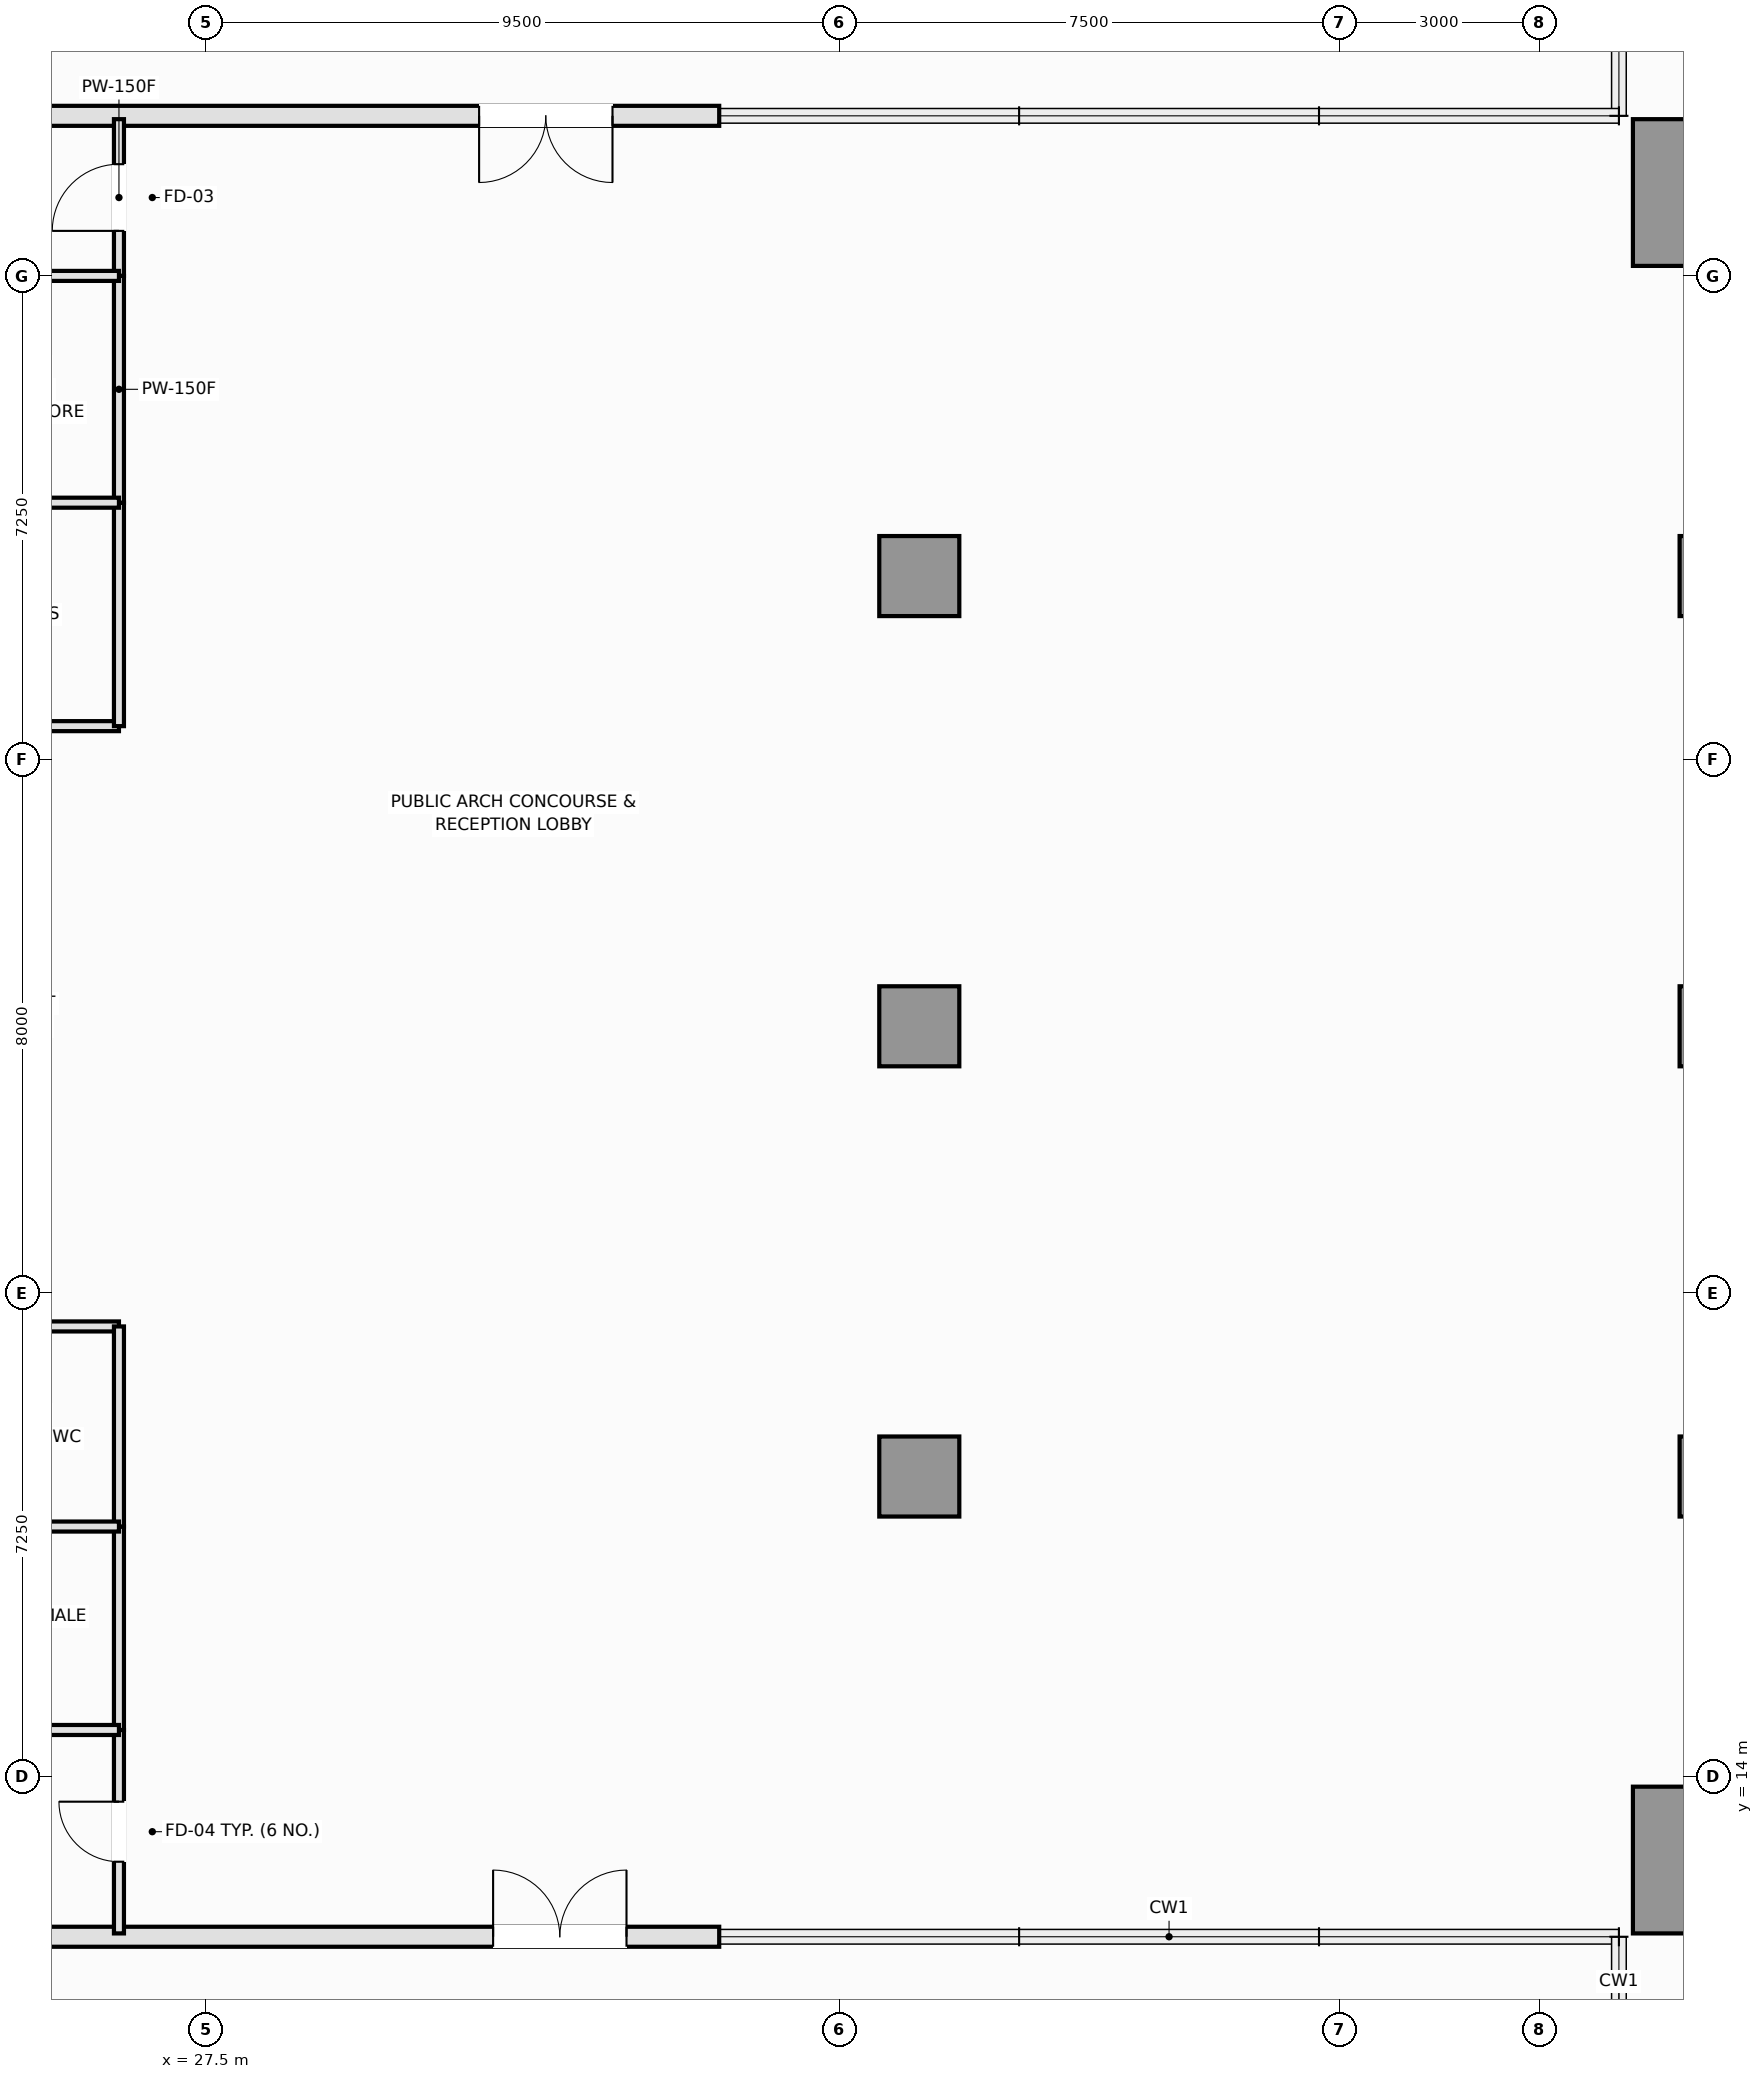
"""IFC4 building model, lengths in metres.
Left out: names, types, materials, properties, quantities, classifications, styles, units other than length and angle.
Written with IfcOpenShell. Run it as: python <this file> out.ifc"""

import sys

from ifc_helpers import new_model, si_unit, direction, frame, frame_2d, origin, origin_2d, place, context, subcontext, project, spatial, rectangle, extrude, element, fill, save


model = new_model("IFC4")
c1 = context("Model", 3, precision=1e-05, world=origin(), true_north=direction((0.0, 1.0)))
c2 = subcontext(c1, "Body", "Model", "MODEL_VIEW")
j1 = project(units=[si_unit("LENGTHUNIT", "METRE"), si_unit("PLANEANGLEUNIT", "RADIAN")], contexts=[c1])
p1 = place(None, origin())
s1 = spatial("IfcSite", under=j1, at=p1, CompositionType="ELEMENT")
p2 = place(p1, origin())
s2 = spatial("IfcBuilding", under=s1, at=p2, CompositionType="ELEMENT")
p3 = place(p2, origin())
s3 = spatial("IfcBuildingStorey", under=s2, at=p3, CompositionType="ELEMENT", Elevation=0.0)
for number, where, z_axis, x_axis in (
    (1, (38.2, 18.5, 0.0), (0.0, 0.0, 1.0), (1.0, 0.0, 0.0)),
    (2, (38.2, 25.25, 0.0), (0.0, 0.0, 1.0), (1.0, 0.0, 0.0)),
    (3, (38.2, 32.0, 0.0), (0.0, 0.0, 1.0), (1.0, 0.0, 0.0)),
):
    element("IfcColumn", number, at=place(p3, frame(where, z_axis=z_axis, x_axis=x_axis)), inside=s3, PredefinedType="COLUMN", context=c2, shape_type="SweptSolid", body=[
        extrude(rectangle(XDim=1.2, YDim=1.2, at=origin_2d()), origin(), (0.0, 0.0, 1.0), 6.0),
    ])
for number, where, z_axis, x_axis in (
    (4, (50.2, 12.75, 0.0), (0.0, 0.0, 1.0), (1.0, 0.0, 0.0)),
    (5, (50.2, 37.75, 0.0), (0.0, 0.0, 1.0), (1.0, 0.0, 0.0)),
):
    element("IfcColumn", number, at=place(p3, frame(where, z_axis=z_axis, x_axis=x_axis)), inside=s3, PredefinedType="COLUMN", context=c2, shape_type="SweptSolid", body=[
        extrude(rectangle(XDim=2.6, YDim=2.2, at=origin_2d()), origin(), (0.0, 0.0, 1.0), 6.0),
    ])
for number, where, z_axis, x_axis in (
    (6, (50.2, 18.5, 0.0), (0.0, 0.0, 1.0), (1.0, 0.0, 0.0)),
    (7, (50.2, 25.25, 0.0), (0.0, 0.0, 1.0), (1.0, 0.0, 0.0)),
    (8, (50.2, 32.0, 0.0), (0.0, 0.0, 1.0), (1.0, 0.0, 0.0)),
):
    element("IfcColumn", number, at=place(p3, frame(where, z_axis=z_axis, x_axis=x_axis)), inside=s3, PredefinedType="COLUMN", context=c2, shape_type="SweptSolid", body=[
        extrude(rectangle(XDim=1.2, YDim=1.2, at=origin_2d()), origin(), (0.0, 0.0, 1.0), 6.0),
    ])
p4 = place(p3, frame((21.31, 11.6, 0.0), z_axis=(0.0, 0.0, 1.0), x_axis=(1.0, 0.0, 0.0)))
e9 = element("IfcWall", 9, at=p4, inside=s3, PredefinedType="SOLIDWALL", context=c2, shape_type="SweptSolid", body=[
    extrude(rectangle(XDim=13.89, YDim=0.3, at=frame_2d((6.945, 0.0))), origin(), (0.0, 0.0, 1.0), 5.8),
])
p5 = place(p4, frame((1.3, 0.0, 0.0)))
e10 = element("IfcOpeningElement", 10, at=p5, cuts=e9, PredefinedType="OPENING", context=c2, shape_type="SweptSolid", body=[
    extrude(rectangle(XDim=2.0, YDim=2.4, at=frame_2d((1.0, 1.2))), frame((0.0, 0.16, 0.0), z_axis=(0.0, -1.0, 0.0), x_axis=(1.0, 0.0, 0.0)), (0.0, 0.0, 1.0), 0.32),
])
p6 = place(p4, frame((10.5, 0.0, 0.0)))
e11 = element("IfcOpeningElement", 11, at=p6, cuts=e9, PredefinedType="OPENING", context=c2, shape_type="SweptSolid", body=[
    extrude(rectangle(XDim=2.0, YDim=2.4, at=frame_2d((1.0, 1.2))), frame((0.0, 0.16, 0.0), z_axis=(0.0, -1.0, 0.0), x_axis=(1.0, 0.0, 0.0)), (0.0, 0.0, 1.0), 0.32),
])
p7 = place(p3, frame((35.2, 38.9, 0.0), z_axis=(0.0, 0.0, 1.0), x_axis=(-1.0, 0.0, 0.0)))
e12 = element("IfcWall", 12, at=p7, inside=s3, PredefinedType="SOLIDWALL", context=c2, shape_type="SweptSolid", body=[
    extrude(rectangle(XDim=13.89, YDim=0.3, at=frame_2d((6.945, 0.0))), origin(), (0.0, 0.0, 1.0), 5.8),
])
p8 = place(p7, frame((1.6, 0.0, 0.0)))
e13 = element("IfcOpeningElement", 13, at=p8, cuts=e12, PredefinedType="OPENING", context=c2, shape_type="SweptSolid", body=[
    extrude(rectangle(XDim=2.0, YDim=2.4, at=frame_2d((1.0, 1.2))), frame((0.0, 0.16, 0.0), z_axis=(0.0, -1.0, 0.0), x_axis=(1.0, 0.0, 0.0)), (0.0, 0.0, 1.0), 0.32),
])
p9 = place(p7, frame((10.8, 0.0, 0.0)))
e14 = element("IfcOpeningElement", 14, at=p9, cuts=e12, PredefinedType="OPENING", context=c2, shape_type="SweptSolid", body=[
    extrude(rectangle(XDim=2.0, YDim=2.4, at=frame_2d((1.0, 1.2))), frame((0.0, 0.16, 0.0), z_axis=(0.0, -1.0, 0.0), x_axis=(1.0, 0.0, 0.0)), (0.0, 0.0, 1.0), 0.32),
])
for number, where, z_axis, x_axis in (
    (15, (22.55, 20.75, 0.0), (0.0, 0.0, 1.0), (1.0, 0.0, 0.0)),
    (16, (22.55, 29.75, 0.0), (0.0, 0.0, 1.0), (1.0, 0.0, 0.0)),
):
    element("IfcWall", number, at=place(p3, frame(where, z_axis=z_axis, x_axis=x_axis)), inside=s3, PredefinedType="PLUMBINGWALL", context=c2, shape_type="SweptSolid", body=[
        extrude(rectangle(XDim=3.65, YDim=0.15, at=frame_2d((1.825, 0.0))), origin(), (0.0, 0.0, 1.0), 5.8),
    ])
p10 = place(p3, frame((26.2, 36.5, 0.0), z_axis=(0.0, 0.0, 1.0), x_axis=(0.0, 1.0, 0.0)))
e17 = element("IfcWall", 17, at=p10, inside=s3, PredefinedType="PARTITIONING", context=c2, shape_type="SweptSolid", body=[
    extrude(rectangle(XDim=2.35, YDim=0.15, at=frame_2d((1.175, 0.0))), origin(), (0.0, 0.0, 1.0), 5.8),
])
p11 = place(p10, frame((0.675, 0.0, 0.0)))
e18 = element("IfcOpeningElement", 18, at=p11, cuts=e17, PredefinedType="OPENING", context=c2, shape_type="SweptSolid", body=[
    extrude(rectangle(XDim=1.0, YDim=2.15, at=frame_2d((0.5, 1.075))), frame((0.0, 0.085, 0.0), z_axis=(0.0, -1.0, 0.0), x_axis=(1.0, 0.0, 0.0)), (0.0, 0.0, 1.0), 0.17),
])
p12 = place(p3, frame((26.2, 11.65, 0.0), z_axis=(0.0, 0.0, 1.0), x_axis=(0.0, 1.0, 0.0)))
e19 = element("IfcWall", 19, at=p12, inside=s3, PredefinedType="PLUMBINGWALL", context=c2, shape_type="SweptSolid", body=[
    extrude(rectangle(XDim=3.05, YDim=0.15, at=frame_2d((1.525, 0.0))), origin(), (0.0, 0.0, 1.0), 5.8),
])
p13 = place(p12, frame((1.075, 0.0, 0.0)))
e20 = element("IfcOpeningElement", 20, at=p13, cuts=e19, PredefinedType="OPENING", context=c2, shape_type="SweptSolid", body=[
    extrude(rectangle(XDim=0.9, YDim=2.1, at=frame_2d((0.45, 1.05))), frame((0.0, 0.085, 0.0), z_axis=(0.0, -1.0, 0.0), x_axis=(1.0, 0.0, 0.0)), (0.0, 0.0, 1.0), 0.17),
])
p14 = place(p3, frame((26.2, 14.7, 0.0), z_axis=(0.0, 0.0, 1.0), x_axis=(0.0, 1.0, 0.0)))
e21 = element("IfcWall", 21, at=p14, inside=s3, PredefinedType="PLUMBINGWALL", context=c2, shape_type="SweptSolid", body=[
    extrude(rectangle(XDim=3.05, YDim=0.15, at=frame_2d((1.525, 0.0))), origin(), (0.0, 0.0, 1.0), 5.8),
])
p15 = place(p3, frame((26.2, 17.75, 0.0), z_axis=(0.0, 0.0, 1.0), x_axis=(0.0, 1.0, 0.0)))
e22 = element("IfcWall", 22, at=p15, inside=s3, PredefinedType="PLUMBINGWALL", context=c2, shape_type="SweptSolid", body=[
    extrude(rectangle(XDim=3.0, YDim=0.15, at=frame_2d((1.5, 0.0))), origin(), (0.0, 0.0, 1.0), 5.8),
])
p16 = place(p3, frame((26.2, 29.75, 0.0), z_axis=(0.0, 0.0, 1.0), x_axis=(0.0, 1.0, 0.0)))
e23 = element("IfcWall", 23, at=p16, inside=s3, PredefinedType="PLUMBINGWALL", context=c2, shape_type="SweptSolid", body=[
    extrude(rectangle(XDim=3.35, YDim=0.15, at=frame_2d((1.675, 0.0))), origin(), (0.0, 0.0, 1.0), 5.8),
])
p17 = place(p3, frame((26.2, 33.1, 0.0), z_axis=(0.0, 0.0, 1.0), x_axis=(0.0, 1.0, 0.0)))
e24 = element("IfcWall", 24, at=p17, inside=s3, PredefinedType="PARTITIONING", context=c2, shape_type="SweptSolid", body=[
    extrude(rectangle(XDim=3.4, YDim=0.15, at=frame_2d((1.7, 0.0))), origin(), (0.0, 0.0, 1.0), 5.8),
])
p18 = place(p3, frame((22.55, 36.5, 0.0), z_axis=(0.0, 0.0, 1.0), x_axis=(1.0, 0.0, 0.0)))
e25 = element("IfcWall", 25, at=p18, inside=s3, PredefinedType="PARTITIONING", context=c2, shape_type="SweptSolid", body=[
    extrude(rectangle(XDim=3.65, YDim=0.15, at=frame_2d((1.825, 0.0))), origin(), (0.0, 0.0, 1.0), 5.8),
])
for number, where, z_axis, x_axis in (
    (26, (22.55, 14.7, 0.0), (0.0, 0.0, 1.0), (1.0, 0.0, 0.0)),
    (27, (22.55, 17.75, 0.0), (0.0, 0.0, 1.0), (1.0, 0.0, 0.0)),
    (28, (22.55, 33.1, 0.0), (0.0, 0.0, 1.0), (1.0, 0.0, 0.0)),
):
    element("IfcWall", number, at=place(p3, frame(where, z_axis=z_axis, x_axis=x_axis)), inside=s3, PredefinedType="PLUMBINGWALL", context=c2, shape_type="SweptSolid", body=[
        extrude(rectangle(XDim=3.65, YDim=0.15, at=frame_2d((1.825, 0.0))), origin(), (0.0, 0.0, 1.0), 5.8),
    ])
p19 = place(p6, frame((2.0, 0.0, 0.0), z_axis=(0.0, 0.0, 1.0), x_axis=(-1.0, 0.0, 0.0)))
e29 = element("IfcDoor", 29, at=p19, inside=s3, OperationType="DOUBLE_DOOR_SINGLE_SWING", PredefinedType="DOOR", context=c2, shape_type="SweptSolid", body=[
    extrude(rectangle(XDim=2.0, YDim=2.4, at=frame_2d((1.0, 1.2))), frame((0.0, 0.025, 0.0), z_axis=(0.0, -1.0, 0.0), x_axis=(1.0, 0.0, 0.0)), (0.0, 0.0, 1.0), 0.05),
])
fill(e11, e29)
p20 = place(p8, frame((2.0, 0.0, 0.0), z_axis=(0.0, 0.0, 1.0), x_axis=(-1.0, 0.0, 0.0)))
e30 = element("IfcDoor", 30, at=p20, inside=s3, OperationType="DOUBLE_DOOR_SINGLE_SWING", PredefinedType="DOOR", context=c2, shape_type="SweptSolid", body=[
    extrude(rectangle(XDim=2.0, YDim=2.4, at=frame_2d((1.0, 1.2))), frame((0.0, 0.025, 0.0), z_axis=(0.0, -1.0, 0.0), x_axis=(1.0, 0.0, 0.0)), (0.0, 0.0, 1.0), 0.05),
])
fill(e13, e30)
p21 = place(p11, origin())
e31 = element("IfcDoor", 31, at=p21, inside=s3, OperationType="SINGLE_SWING_LEFT", PredefinedType="DOOR", context=c2, shape_type="SweptSolid", body=[
    extrude(rectangle(XDim=1.0, YDim=2.15, at=frame_2d((0.5, 1.075))), frame((0.0, 0.025, 0.0), z_axis=(0.0, -1.0, 0.0), x_axis=(1.0, 0.0, 0.0)), (0.0, 0.0, 1.0), 0.05),
])
fill(e18, e31)
p22 = place(p13, origin())
e32 = element("IfcDoor", 32, at=p22, inside=s3, OperationType="SINGLE_SWING_RIGHT", PredefinedType="DOOR", context=c2, shape_type="SweptSolid", body=[
    extrude(rectangle(XDim=0.9, YDim=2.1, at=frame_2d((0.45, 1.05))), frame((0.0, 0.025, 0.0), z_axis=(0.0, -1.0, 0.0), x_axis=(1.0, 0.0, 0.0)), (0.0, 0.0, 1.0), 0.05),
])
fill(e20, e32)
save(model, sys.argv[1])
